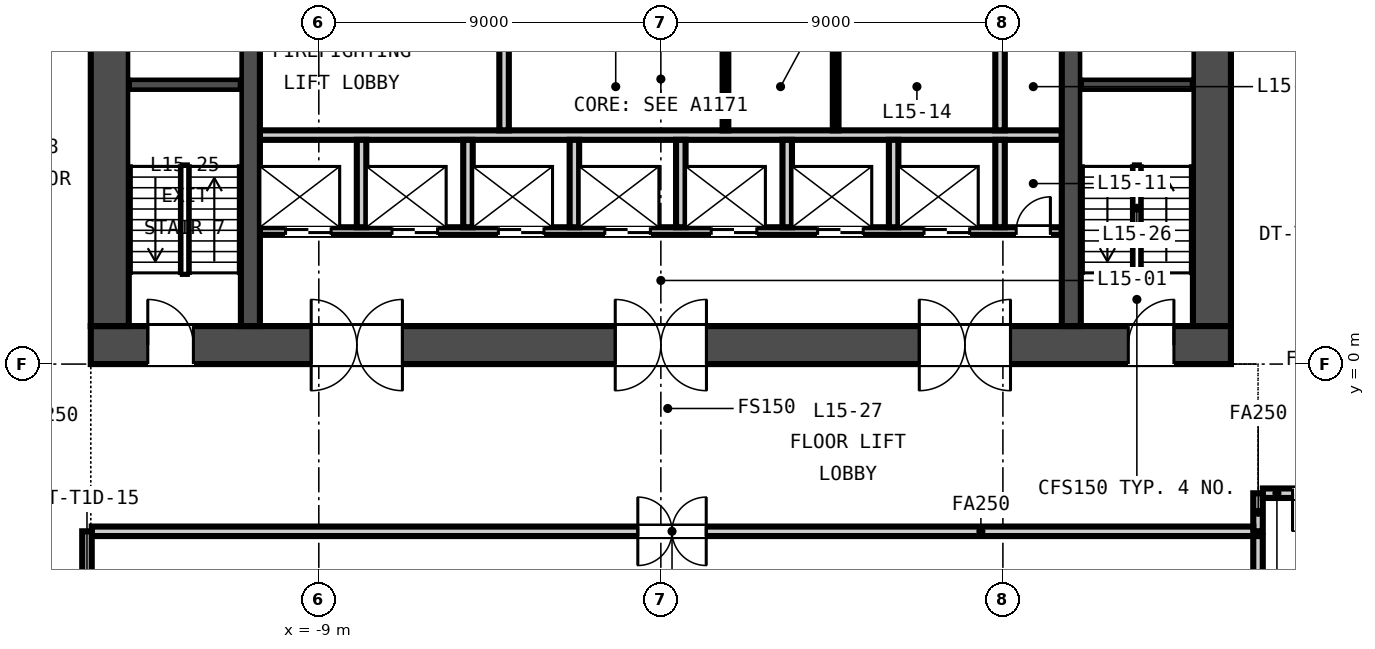
"""IFC4 building model, lengths in metres.
Left out: names, types, materials, properties, quantities, classifications, styles, units other than length and angle.
Written with IfcOpenShell. Run it as: python <this file> out.ifc"""

import sys

from ifc_helpers import new_model, si_unit, direction, frame, frame_2d, origin, place, context, subcontext, project, spatial, rectangle, extrude, element, fill, save


model = new_model("IFC4")
c1 = context("Model", 3, precision=1e-05, world=origin(), true_north=direction((0.0, 1.0)))
c2 = subcontext(c1, "Body", "Model", "MODEL_VIEW")
j1 = project(units=[si_unit("LENGTHUNIT", "METRE"), si_unit("PLANEANGLEUNIT", "RADIAN")], contexts=[c1])
p1 = place(None, origin())
s1 = spatial("IfcSite", under=j1, at=p1, CompositionType="ELEMENT")
p2 = place(p1, origin())
s2 = spatial("IfcBuilding", under=s1, at=p2, CompositionType="ELEMENT")
p3 = place(p2, frame((0.0, 0.0, 68.85)))
s3 = spatial("IfcBuildingStorey", under=s2, at=p3, CompositionType="ELEMENT", Elevation=68.85)
p4 = place(p3, frame((-15.0, 0.5, -0.15), z_axis=(0.0, 0.0, 1.0), x_axis=(1.0, 0.0, 0.0)))
e1 = element("IfcWall", 1, at=p4, inside=s3, PredefinedType="SOLIDWALL", context=c2, shape_type="SweptSolid", body=[
    extrude(rectangle(XDim=30.0, YDim=1.0, at=frame_2d((15.0, 0.0))), origin(), (0.0, 0.0, 1.0), 3.65),
])
p5 = place(p4, frame((5.8, 0.0, 0.15)))
e2 = element("IfcOpeningElement", 2, at=p5, cuts=e1, PredefinedType="OPENING", context=c2, shape_type="SweptSolid", body=[
    extrude(rectangle(XDim=2.4, YDim=2.4, at=frame_2d((1.2, 1.2))), frame((0.0, 0.51, 0.0), z_axis=(0.0, -1.0, 0.0), x_axis=(1.0, 0.0, 0.0)), (0.0, 0.0, 1.0), 1.02),
])
p6 = place(p4, frame((13.8, 0.0, 0.15)))
e3 = element("IfcOpeningElement", 3, at=p6, cuts=e1, PredefinedType="OPENING", context=c2, shape_type="SweptSolid", body=[
    extrude(rectangle(XDim=2.4, YDim=2.4, at=frame_2d((1.2, 1.2))), frame((0.0, 0.51, 0.0), z_axis=(0.0, -1.0, 0.0), x_axis=(1.0, 0.0, 0.0)), (0.0, 0.0, 1.0), 1.02),
])
p7 = place(p4, frame((21.8, 0.0, 0.15)))
e4 = element("IfcOpeningElement", 4, at=p7, cuts=e1, PredefinedType="OPENING", context=c2, shape_type="SweptSolid", body=[
    extrude(rectangle(XDim=2.4, YDim=2.4, at=frame_2d((1.2, 1.2))), frame((0.0, 0.51, 0.0), z_axis=(0.0, -1.0, 0.0), x_axis=(1.0, 0.0, 0.0)), (0.0, 0.0, 1.0), 1.02),
])
p8 = place(p4, frame((1.5, 0.0, 0.15)))
e5 = element("IfcOpeningElement", 5, at=p8, cuts=e1, PredefinedType="OPENING", context=c2, shape_type="SweptSolid", body=[
    extrude(rectangle(XDim=1.2, YDim=2.1, at=frame_2d((0.6, 1.05))), frame((0.0, 0.51, 0.0), z_axis=(0.0, -1.0, 0.0), x_axis=(1.0, 0.0, 0.0)), (0.0, 0.0, 1.0), 1.02),
])
p9 = place(p4, frame((27.3, 0.0, 0.15)))
e6 = element("IfcOpeningElement", 6, at=p9, cuts=e1, PredefinedType="OPENING", context=c2, shape_type="SweptSolid", body=[
    extrude(rectangle(XDim=1.2, YDim=2.1, at=frame_2d((0.6, 1.05))), frame((0.0, 0.51, 0.0), z_axis=(0.0, -1.0, 0.0), x_axis=(1.0, 0.0, 0.0)), (0.0, 0.0, 1.0), 1.02),
])
for number, where, z_axis, x_axis in (
    (7, (-14.5, 1.0, -0.15), (0.0, 0.0, 1.0), (0.0, 1.0, 0.0)),
    (8, (14.5, 1.0, -0.15), (0.0, 0.0, 1.0), (0.0, 1.0, 0.0)),
):
    element("IfcWall", number, at=place(p3, frame(where, z_axis=z_axis, x_axis=x_axis)), inside=s3, PredefinedType="SOLIDWALL", context=c2, shape_type="SweptSolid", body=[
        extrude(rectangle(XDim=13.0, YDim=1.0, at=frame_2d((6.5, 0.0))), origin(), (0.0, 0.0, 1.0), 3.65),
    ])
for number, where, z_axis, x_axis in (
    (9, (-10.8, 1.0, -0.15), (0.0, 0.0, 1.0), (0.0, 1.0, 0.0)),
    (10, (10.8, 1.0, -0.15), (0.0, 0.0, 1.0), (0.0, 1.0, 0.0)),
):
    element("IfcWall", number, at=place(p3, frame(where, z_axis=z_axis, x_axis=x_axis)), inside=s3, PredefinedType="SOLIDWALL", context=c2, shape_type="SweptSolid", body=[
        extrude(rectangle(XDim=13.0, YDim=0.5, at=frame_2d((6.5, 0.0))), origin(), (0.0, 0.0, 1.0), 3.65),
    ])
p10 = place(p3, frame((-10.55, 3.5, 0.0), z_axis=(0.0, 0.0, 1.0), x_axis=(1.0, 0.0, 0.0)))
e11 = element("IfcWall", 11, at=p10, inside=s3, PredefinedType="PARTITIONING", context=c2, shape_type="SweptSolid", body=[
    extrude(rectangle(XDim=21.1, YDim=0.2, at=frame_2d((10.55, 0.0))), origin(), (0.0, 0.0, 1.0), 3.5),
])
p11 = place(p10, frame((0.675, 0.0, 0.0)))
e12 = element("IfcOpeningElement", 12, at=p11, cuts=e11, PredefinedType="OPENING", context=c2, shape_type="SweptSolid", body=[
    extrude(rectangle(XDim=1.2, YDim=2.1, at=frame_2d((0.6, 1.05))), frame((0.0, 0.11, 0.0), z_axis=(0.0, -1.0, 0.0), x_axis=(1.0, 0.0, 0.0)), (0.0, 0.0, 1.0), 0.22),
])
p12 = place(p10, frame((3.475, 0.0, 0.0)))
e13 = element("IfcOpeningElement", 13, at=p12, cuts=e11, PredefinedType="OPENING", context=c2, shape_type="SweptSolid", body=[
    extrude(rectangle(XDim=1.2, YDim=2.1, at=frame_2d((0.6, 1.05))), frame((0.0, 0.11, 0.0), z_axis=(0.0, -1.0, 0.0), x_axis=(1.0, 0.0, 0.0)), (0.0, 0.0, 1.0), 0.22),
])
p13 = place(p10, frame((6.275, 0.0, 0.0)))
e14 = element("IfcOpeningElement", 14, at=p13, cuts=e11, PredefinedType="OPENING", context=c2, shape_type="SweptSolid", body=[
    extrude(rectangle(XDim=1.2, YDim=2.1, at=frame_2d((0.6, 1.05))), frame((0.0, 0.11, 0.0), z_axis=(0.0, -1.0, 0.0), x_axis=(1.0, 0.0, 0.0)), (0.0, 0.0, 1.0), 0.22),
])
p14 = place(p10, frame((9.075, 0.0, 0.0)))
e15 = element("IfcOpeningElement", 15, at=p14, cuts=e11, PredefinedType="OPENING", context=c2, shape_type="SweptSolid", body=[
    extrude(rectangle(XDim=1.2, YDim=2.1, at=frame_2d((0.6, 1.05))), frame((0.0, 0.11, 0.0), z_axis=(0.0, -1.0, 0.0), x_axis=(1.0, 0.0, 0.0)), (0.0, 0.0, 1.0), 0.22),
])
p15 = place(p10, frame((11.875, 0.0, 0.0)))
e16 = element("IfcOpeningElement", 16, at=p15, cuts=e11, PredefinedType="OPENING", context=c2, shape_type="SweptSolid", body=[
    extrude(rectangle(XDim=1.2, YDim=2.1, at=frame_2d((0.6, 1.05))), frame((0.0, 0.11, 0.0), z_axis=(0.0, -1.0, 0.0), x_axis=(1.0, 0.0, 0.0)), (0.0, 0.0, 1.0), 0.22),
])
p16 = place(p10, frame((14.675, 0.0, 0.0)))
e17 = element("IfcOpeningElement", 17, at=p16, cuts=e11, PredefinedType="OPENING", context=c2, shape_type="SweptSolid", body=[
    extrude(rectangle(XDim=1.2, YDim=2.1, at=frame_2d((0.6, 1.05))), frame((0.0, 0.11, 0.0), z_axis=(0.0, -1.0, 0.0), x_axis=(1.0, 0.0, 0.0)), (0.0, 0.0, 1.0), 0.22),
])
p17 = place(p10, frame((17.475, 0.0, 0.0)))
e18 = element("IfcOpeningElement", 18, at=p17, cuts=e11, PredefinedType="OPENING", context=c2, shape_type="SweptSolid", body=[
    extrude(rectangle(XDim=1.2, YDim=2.1, at=frame_2d((0.6, 1.05))), frame((0.0, 0.11, 0.0), z_axis=(0.0, -1.0, 0.0), x_axis=(1.0, 0.0, 0.0)), (0.0, 0.0, 1.0), 0.22),
])
p18 = place(p10, frame((19.9, 0.0, 0.0)))
e19 = element("IfcOpeningElement", 19, at=p18, cuts=e11, PredefinedType="OPENING", context=c2, shape_type="SweptSolid", body=[
    extrude(rectangle(XDim=0.9, YDim=2.1, at=frame_2d((0.45, 1.05))), frame((0.0, 0.11, 0.0), z_axis=(0.0, -1.0, 0.0), x_axis=(1.0, 0.0, 0.0)), (0.0, 0.0, 1.0), 0.22),
])
p19 = place(p3, frame((-10.55, 6.025, 0.0), z_axis=(0.0, 0.0, 1.0), x_axis=(1.0, 0.0, 0.0)))
e20 = element("IfcWall", 20, at=p19, inside=s3, PredefinedType="PARTITIONING", context=c2, shape_type="SweptSolid", body=[
    extrude(rectangle(XDim=21.1, YDim=0.25, at=frame_2d((10.55, 0.0))), origin(), (0.0, 0.0, 1.0), 3.5),
])
p20 = place(p3, frame((-4.125, 6.15, 0.0), z_axis=(0.0, 0.0, 1.0), x_axis=(0.0, 1.0, 0.0)))
e21 = element("IfcWall", 21, at=p20, inside=s3, PredefinedType="PARTITIONING", context=c2, shape_type="SweptSolid", body=[
    extrude(rectangle(XDim=4.95, YDim=0.25, at=frame_2d((2.475, 0.0))), origin(), (0.0, 0.0, 1.0), 3.5),
])
p21 = place(p20, frame((3.125, 0.0, 0.0)))
e22 = element("IfcOpeningElement", 22, at=p21, cuts=e21, PredefinedType="OPENING", context=c2, shape_type="SweptSolid", body=[
    extrude(rectangle(XDim=1.2, YDim=2.1, at=frame_2d((0.6, 1.05))), frame((0.0, 0.135, 0.0), z_axis=(0.0, -1.0, 0.0), x_axis=(1.0, 0.0, 0.0)), (0.0, 0.0, 1.0), 0.27),
])
for number, where, z_axis, x_axis in (
    (23, (-7.875, 3.6, 0.0), (0.0, 0.0, 1.0), (0.0, 1.0, 0.0)),
    (24, (-5.075, 3.6, 0.0), (0.0, 0.0, 1.0), (0.0, 1.0, 0.0)),
    (25, (-2.275, 3.6, 0.0), (0.0, 0.0, 1.0), (0.0, 1.0, 0.0)),
    (26, (0.525, 3.6, 0.0), (0.0, 0.0, 1.0), (0.0, 1.0, 0.0)),
    (27, (3.325, 3.6, 0.0), (0.0, 0.0, 1.0), (0.0, 1.0, 0.0)),
    (28, (6.125, 3.6, 0.0), (0.0, 0.0, 1.0), (0.0, 1.0, 0.0)),
    (29, (8.925, 3.6, 0.0), (0.0, 0.0, 1.0), (0.0, 1.0, 0.0)),
):
    element("IfcWall", number, at=place(p3, frame(where, z_axis=z_axis, x_axis=x_axis)), inside=s3, PredefinedType="PARTITIONING", context=c2, shape_type="SweptSolid", body=[
        extrude(rectangle(XDim=2.3, YDim=0.25, at=frame_2d((1.15, 0.0))), origin(), (0.0, 0.0, 1.0), 3.5),
    ])
for number, where, z_axis, x_axis in (
    (30, (1.7, 6.15, 0.0), (0.0, 0.0, 1.0), (0.0, 1.0, 0.0)),
    (31, (4.6, 6.15, 0.0), (0.0, 0.0, 1.0), (0.0, 1.0, 0.0)),
):
    element("IfcWall", number, at=place(p3, frame(where, z_axis=z_axis, x_axis=x_axis)), inside=s3, PredefinedType="PARTITIONING", context=c2, shape_type="SweptSolid", body=[
        extrude(rectangle(XDim=2.3, YDim=0.15, at=frame_2d((1.15, 0.0))), origin(), (0.0, 0.0, 1.0), 3.5),
    ])
p22 = place(p3, frame((8.925, 6.15, 0.0), z_axis=(0.0, 0.0, 1.0), x_axis=(0.0, 1.0, 0.0)))
e32 = element("IfcWall", 32, at=p22, inside=s3, PredefinedType="PARTITIONING", context=c2, shape_type="SweptSolid", body=[
    extrude(rectangle(XDim=2.3, YDim=0.25, at=frame_2d((1.15, 0.0))), origin(), (0.0, 0.0, 1.0), 3.5),
])
for number, where, z_axis, x_axis in (
    (33, (-14.0, 7.35, -0.15), (0.0, 0.0, 1.0), (1.0, 0.0, 0.0)),
    (34, (11.05, 7.35, -0.15), (0.0, 0.0, 1.0), (1.0, 0.0, 0.0)),
):
    element("IfcWall", number, at=place(p3, frame(where, z_axis=z_axis, x_axis=x_axis)), inside=s3, PredefinedType="SOLIDWALL", context=c2, shape_type="SweptSolid", body=[
        extrude(rectangle(XDim=2.95, YDim=0.3, at=frame_2d((1.475, 0.0))), origin(), (0.0, 0.0, 1.0), 3.65),
    ])
p23 = place(p3, frame((15.713, -3.4, 0.0), z_axis=(0.0, 0.0, 1.0), x_axis=(0.0, -1.0, 0.0)))
e35 = element("IfcWall", 35, at=p23, inside=s3, PredefinedType="PARTITIONING", context=c2, shape_type="SweptSolid", body=[
    extrude(rectangle(XDim=1.0, YDim=0.25, at=frame_2d((0.5, 0.0))), origin(), (0.0, 0.0, 1.0), 2.741),
])
p24 = place(p3, frame((15.588, -4.4, 0.0), z_axis=(0.0, 0.0, 1.0), x_axis=(-1.0, 0.0, 0.0)))
e36 = element("IfcWall", 36, at=p24, inside=s3, PredefinedType="PARTITIONING", context=c2, shape_type="SweptSolid", body=[
    extrude(rectangle(XDim=30.563, YDim=0.25, at=frame_2d((15.281, 0.0))), origin(), (0.0, 0.0, 1.0), 2.741),
])
p25 = place(p24, frame((14.394, 0.0, 0.0)))
e37 = element("IfcOpeningElement", 37, at=p25, cuts=e36, PredefinedType="OPENING", context=c2, shape_type="SweptSolid", body=[
    extrude(rectangle(XDim=1.8, YDim=2.1, at=frame_2d((0.9, 1.05))), frame((0.0, 0.135, 0.0), z_axis=(0.0, -1.0, 0.0), x_axis=(1.0, 0.0, 0.0)), (0.0, 0.0, 1.0), 0.27),
])
p26 = place(p3, frame((-15.1, -4.4, 0.0), z_axis=(0.0, 0.0, 1.0), x_axis=(0.0, -1.0, 0.0)))
e38 = element("IfcWall", 38, at=p26, inside=s3, PredefinedType="PARTITIONING", context=c2, shape_type="SweptSolid", body=[
    extrude(rectangle(XDim=11.875, YDim=0.25, at=frame_2d((5.938, 0.0))), origin(), (0.0, 0.0, 1.0), 2.741),
])
p27 = place(p26, frame((5.038, 0.0, 0.0)))
e39 = element("IfcOpeningElement", 39, at=p27, cuts=e38, PredefinedType="OPENING", context=c2, shape_type="SweptSolid", body=[
    extrude(rectangle(XDim=1.8, YDim=2.1, at=frame_2d((0.9, 1.05))), frame((0.0, 0.135, 0.0), z_axis=(0.0, -1.0, 0.0), x_axis=(1.0, 0.0, 0.0)), (0.0, 0.0, 1.0), 0.27),
])
p28 = place(p3, frame((18.402, -3.398, 0.0), z_axis=(0.0, 0.0, 1.0), x_axis=(-1.0, 0.0, 0.0)))
e40 = element("IfcWall", 40, at=p28, inside=s3, PredefinedType="PARTITIONING", context=c2, shape_type="SweptSolid", body=[
    extrude(rectangle(XDim=2.562, YDim=0.25, at=frame_2d((1.281, 0.0))), origin(), (0.0, 0.0, 1.0), 2.741),
])
p29 = place(p28, frame((0.781, 0.0, 0.0)))
e41 = element("IfcOpeningElement", 41, at=p29, cuts=e40, PredefinedType="OPENING", context=c2, shape_type="SweptSolid", body=[
    extrude(rectangle(XDim=1.0, YDim=2.1, at=frame_2d((0.5, 1.05))), frame((0.0, 0.135, 0.0), z_axis=(0.0, -1.0, 0.0), x_axis=(1.0, 0.0, 0.0)), (0.0, 0.0, 1.0), 0.27),
])
p30 = place(p3, frame((15.713, -4.525, 0.0), z_axis=(0.0, 0.0, 1.0), x_axis=(0.0, -1.0, 0.0)))
e42 = element("IfcWall", 42, at=p30, inside=s3, PredefinedType="PARTITIONING", context=c2, shape_type="SweptSolid", body=[
    extrude(rectangle(XDim=3.7, YDim=0.25, at=frame_2d((1.85, 0.0))), origin(), (0.0, 0.0, 1.0), 2.741),
])
p31 = place(p11, origin())
e43 = element("IfcDoor", 43, at=p31, inside=s3, OperationType="DOUBLE_DOOR_SLIDING", PredefinedType="DOOR", context=c2, shape_type="SweptSolid", body=[
    extrude(rectangle(XDim=1.2, YDim=2.1, at=frame_2d((0.6, 1.05))), frame((0.0, 0.025, 0.0), z_axis=(0.0, -1.0, 0.0), x_axis=(1.0, 0.0, 0.0)), (0.0, 0.0, 1.0), 0.05),
])
fill(e12, e43)
p32 = place(p12, origin())
e44 = element("IfcDoor", 44, at=p32, inside=s3, OperationType="DOUBLE_DOOR_SLIDING", PredefinedType="DOOR", context=c2, shape_type="SweptSolid", body=[
    extrude(rectangle(XDim=1.2, YDim=2.1, at=frame_2d((0.6, 1.05))), frame((0.0, 0.025, 0.0), z_axis=(0.0, -1.0, 0.0), x_axis=(1.0, 0.0, 0.0)), (0.0, 0.0, 1.0), 0.05),
])
fill(e13, e44)
p33 = place(p13, origin())
e45 = element("IfcDoor", 45, at=p33, inside=s3, OperationType="DOUBLE_DOOR_SLIDING", PredefinedType="DOOR", context=c2, shape_type="SweptSolid", body=[
    extrude(rectangle(XDim=1.2, YDim=2.1, at=frame_2d((0.6, 1.05))), frame((0.0, 0.025, 0.0), z_axis=(0.0, -1.0, 0.0), x_axis=(1.0, 0.0, 0.0)), (0.0, 0.0, 1.0), 0.05),
])
fill(e14, e45)
p34 = place(p14, origin())
e46 = element("IfcDoor", 46, at=p34, inside=s3, OperationType="DOUBLE_DOOR_SLIDING", PredefinedType="DOOR", context=c2, shape_type="SweptSolid", body=[
    extrude(rectangle(XDim=1.2, YDim=2.1, at=frame_2d((0.6, 1.05))), frame((0.0, 0.025, 0.0), z_axis=(0.0, -1.0, 0.0), x_axis=(1.0, 0.0, 0.0)), (0.0, 0.0, 1.0), 0.05),
])
fill(e15, e46)
p35 = place(p15, origin())
e47 = element("IfcDoor", 47, at=p35, inside=s3, OperationType="DOUBLE_DOOR_SLIDING", PredefinedType="DOOR", context=c2, shape_type="SweptSolid", body=[
    extrude(rectangle(XDim=1.2, YDim=2.1, at=frame_2d((0.6, 1.05))), frame((0.0, 0.025, 0.0), z_axis=(0.0, -1.0, 0.0), x_axis=(1.0, 0.0, 0.0)), (0.0, 0.0, 1.0), 0.05),
])
fill(e16, e47)
p36 = place(p16, origin())
e48 = element("IfcDoor", 48, at=p36, inside=s3, OperationType="DOUBLE_DOOR_SLIDING", PredefinedType="DOOR", context=c2, shape_type="SweptSolid", body=[
    extrude(rectangle(XDim=1.2, YDim=2.1, at=frame_2d((0.6, 1.05))), frame((0.0, 0.025, 0.0), z_axis=(0.0, -1.0, 0.0), x_axis=(1.0, 0.0, 0.0)), (0.0, 0.0, 1.0), 0.05),
])
fill(e17, e48)
p37 = place(p17, origin())
e49 = element("IfcDoor", 49, at=p37, inside=s3, OperationType="DOUBLE_DOOR_SLIDING", PredefinedType="DOOR", context=c2, shape_type="SweptSolid", body=[
    extrude(rectangle(XDim=1.2, YDim=2.1, at=frame_2d((0.6, 1.05))), frame((0.0, 0.025, 0.0), z_axis=(0.0, -1.0, 0.0), x_axis=(1.0, 0.0, 0.0)), (0.0, 0.0, 1.0), 0.05),
])
fill(e18, e49)
p38 = place(p18, origin())
e50 = element("IfcDoor", 50, at=p38, inside=s3, OperationType="SINGLE_SWING_RIGHT", PredefinedType="DOOR", context=c2, shape_type="SweptSolid", body=[
    extrude(rectangle(XDim=0.9, YDim=2.1, at=frame_2d((0.45, 1.05))), frame((0.0, 0.025, 0.0), z_axis=(0.0, -1.0, 0.0), x_axis=(1.0, 0.0, 0.0)), (0.0, 0.0, 1.0), 0.05),
])
fill(e19, e50)
p39 = place(p5, origin())
e51 = element("IfcDoor", 51, at=p39, inside=s3, OperationType="DOUBLE_DOOR_DOUBLE_SWING", PredefinedType="DOOR", context=c2, shape_type="SweptSolid", body=[
    extrude(rectangle(XDim=2.4, YDim=2.4, at=frame_2d((1.2, 1.2))), frame((0.0, 0.025, 0.0), z_axis=(0.0, -1.0, 0.0), x_axis=(1.0, 0.0, 0.0)), (0.0, 0.0, 1.0), 0.05),
])
fill(e2, e51)
p40 = place(p6, origin())
e52 = element("IfcDoor", 52, at=p40, inside=s3, OperationType="DOUBLE_DOOR_DOUBLE_SWING", PredefinedType="DOOR", context=c2, shape_type="SweptSolid", body=[
    extrude(rectangle(XDim=2.4, YDim=2.4, at=frame_2d((1.2, 1.2))), frame((0.0, 0.025, 0.0), z_axis=(0.0, -1.0, 0.0), x_axis=(1.0, 0.0, 0.0)), (0.0, 0.0, 1.0), 0.05),
])
fill(e3, e52)
p41 = place(p7, origin())
e53 = element("IfcDoor", 53, at=p41, inside=s3, OperationType="DOUBLE_DOOR_DOUBLE_SWING", PredefinedType="DOOR", context=c2, shape_type="SweptSolid", body=[
    extrude(rectangle(XDim=2.4, YDim=2.4, at=frame_2d((1.2, 1.2))), frame((0.0, 0.025, 0.0), z_axis=(0.0, -1.0, 0.0), x_axis=(1.0, 0.0, 0.0)), (0.0, 0.0, 1.0), 0.05),
])
fill(e4, e53)
p42 = place(p8, origin())
e54 = element("IfcDoor", 54, at=p42, inside=s3, OperationType="SINGLE_SWING_LEFT", PredefinedType="DOOR", context=c2, shape_type="SweptSolid", body=[
    extrude(rectangle(XDim=1.2, YDim=2.1, at=frame_2d((0.6, 1.05))), frame((0.0, 0.025, 0.0), z_axis=(0.0, -1.0, 0.0), x_axis=(1.0, 0.0, 0.0)), (0.0, 0.0, 1.0), 0.05),
])
fill(e5, e54)
p43 = place(p9, origin())
e55 = element("IfcDoor", 55, at=p43, inside=s3, OperationType="SINGLE_SWING_RIGHT", PredefinedType="DOOR", context=c2, shape_type="SweptSolid", body=[
    extrude(rectangle(XDim=1.2, YDim=2.1, at=frame_2d((0.6, 1.05))), frame((0.0, 0.025, 0.0), z_axis=(0.0, -1.0, 0.0), x_axis=(1.0, 0.0, 0.0)), (0.0, 0.0, 1.0), 0.05),
])
fill(e6, e55)
p44 = place(p29, origin())
e56 = element("IfcDoor", 56, at=p44, inside=s3, OperationType="SINGLE_SWING_RIGHT", PredefinedType="DOOR", context=c2, shape_type="SweptSolid", body=[
    extrude(rectangle(XDim=1.0, YDim=2.1, at=frame_2d((0.5, 1.05))), frame((0.0, 0.025, 0.0), z_axis=(0.0, -1.0, 0.0), x_axis=(1.0, 0.0, 0.0)), (0.0, 0.0, 1.0), 0.05),
])
fill(e41, e56)
p45 = place(p25, origin())
e57 = element("IfcDoor", 57, at=p45, inside=s3, OperationType="DOUBLE_DOOR_DOUBLE_SWING", PredefinedType="DOOR", context=c2, shape_type="SweptSolid", body=[
    extrude(rectangle(XDim=1.8, YDim=2.1, at=frame_2d((0.9, 1.05))), frame((0.0, 0.025, 0.0), z_axis=(0.0, -1.0, 0.0), x_axis=(1.0, 0.0, 0.0)), (0.0, 0.0, 1.0), 0.05),
])
fill(e37, e57)
save(model, sys.argv[1])
